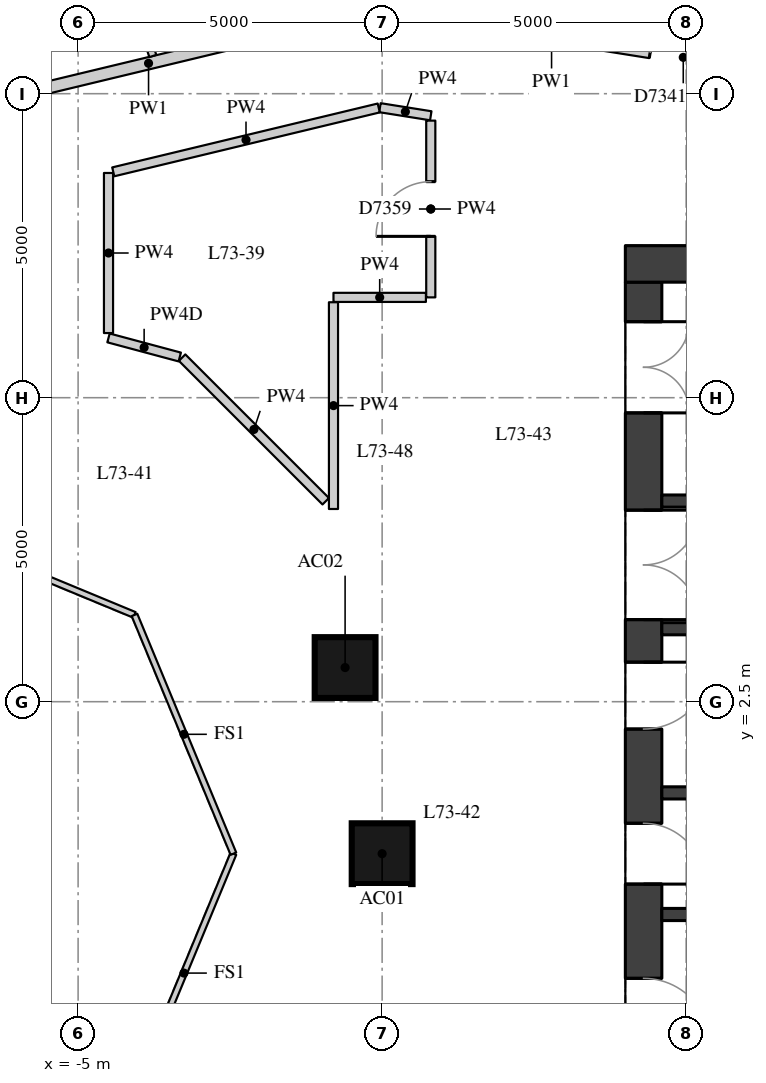
"""IFC4 building model, lengths in metres.
Left out: names, types, materials, properties, quantities, classifications, styles, units other than length and angle.
Written with IfcOpenShell. Run it as: python <this file> out.ifc"""

import sys

from ifc_helpers import new_model, si_unit, direction, frame, frame_2d, origin, origin_2d, place, context, subcontext, project, spatial, rectangle, extrude, element, fill, save


model = new_model("IFC4")
c1 = context("Model", 3, precision=1e-05, world=origin(), true_north=direction((0.0, 1.0)))
c2 = subcontext(c1, "Body", "Model", "MODEL_VIEW")
j1 = project(units=[si_unit("LENGTHUNIT", "METRE"), si_unit("PLANEANGLEUNIT", "RADIAN")], contexts=[c1])
p1 = place(None, origin())
s1 = spatial("IfcSite", under=j1, at=p1, CompositionType="ELEMENT")
p2 = place(p1, origin())
s2 = spatial("IfcBuilding", under=s1, at=p2, CompositionType="ELEMENT")
p3 = place(p2, frame((0.0, 0.0, 256.4)))
s3 = spatial("IfcBuildingStorey", under=s2, at=p3, CompositionType="ELEMENT", Elevation=256.4)
for number, where, z_axis, x_axis in (
    (1, (0.0, 0.0, 0.0), (0.0, 0.0, 1.0), (1.0, 0.0, 0.0)),
    (2, (-0.609, 3.062, 0.0), (0.0, 0.0, 1.0), (1.0, 0.0, 0.0)),
):
    element("IfcColumn", number, at=place(p3, frame(where, z_axis=z_axis, x_axis=x_axis)), inside=s3, PredefinedType="COLUMN", context=c2, shape_type="SweptSolid", body=[
        extrude(rectangle(XDim=1.0, YDim=1.0, at=origin_2d()), origin(), (0.0, 0.0, 1.0), 3.3),
    ])
p4 = place(p3, frame((4.3, -9.4, 0.0), z_axis=(0.0, 0.0, 1.0), x_axis=(0.0, 1.0, 0.0)))
e3 = element("IfcWall", 3, at=p4, inside=s3, PredefinedType="SHEAR", context=c2, shape_type="SweptSolid", body=[
    extrude(rectangle(XDim=18.8, YDim=0.6, at=frame_2d((9.4, 0.0))), origin(), (0.0, 0.0, 1.0), 2.95),
])
p5 = place(p4, frame((0.65, 0.0, 0.0)))
e4 = element("IfcOpeningElement", 4, at=p5, cuts=e3, PredefinedType="OPENING", context=c2, shape_type="SweptSolid", body=[
    extrude(rectangle(XDim=1.5, YDim=2.1, at=frame_2d((0.75, 1.05))), frame((0.0, 0.31, 0.0), z_axis=(0.0, -1.0, 0.0), x_axis=(1.0, 0.0, 0.0)), (0.0, 0.0, 1.0), 0.62),
])
p6 = place(p4, frame((3.75, 0.0, 0.0)))
e5 = element("IfcOpeningElement", 5, at=p6, cuts=e3, PredefinedType="OPENING", context=c2, shape_type="SweptSolid", body=[
    extrude(rectangle(XDim=1.8, YDim=2.1, at=frame_2d((0.9, 1.05))), frame((0.0, 0.31, 0.0), z_axis=(0.0, -1.0, 0.0), x_axis=(1.0, 0.0, 0.0)), (0.0, 0.0, 1.0), 0.62),
])
p7 = place(p4, frame((6.25, 0.0, 0.0)))
e6 = element("IfcOpeningElement", 6, at=p7, cuts=e3, PredefinedType="OPENING", context=c2, shape_type="SweptSolid", body=[
    extrude(rectangle(XDim=1.1, YDim=2.1, at=frame_2d((0.55, 1.05))), frame((0.0, 0.31, 0.0), z_axis=(0.0, -1.0, 0.0), x_axis=(1.0, 0.0, 0.0)), (0.0, 0.0, 1.0), 0.62),
])
p8 = place(p4, frame((8.9, 0.0, 0.0)))
e7 = element("IfcOpeningElement", 7, at=p8, cuts=e3, PredefinedType="OPENING", context=c2, shape_type="SweptSolid", body=[
    extrude(rectangle(XDim=1.0, YDim=2.1, at=frame_2d((0.5, 1.05))), frame((0.0, 0.31, 0.0), z_axis=(0.0, -1.0, 0.0), x_axis=(1.0, 0.0, 0.0)), (0.0, 0.0, 1.0), 0.62),
])
p9 = place(p4, frame((11.45, 0.0, 0.0)))
e8 = element("IfcOpeningElement", 8, at=p9, cuts=e3, PredefinedType="OPENING", context=c2, shape_type="SweptSolid", body=[
    extrude(rectangle(XDim=1.1, YDim=2.1, at=frame_2d((0.55, 1.05))), frame((0.0, 0.31, 0.0), z_axis=(0.0, -1.0, 0.0), x_axis=(1.0, 0.0, 0.0)), (0.0, 0.0, 1.0), 0.62),
])
p10 = place(p4, frame((13.25, 0.0, 0.0)))
e9 = element("IfcOpeningElement", 9, at=p10, cuts=e3, PredefinedType="OPENING", context=c2, shape_type="SweptSolid", body=[
    extrude(rectangle(XDim=1.8, YDim=2.1, at=frame_2d((0.9, 1.05))), frame((0.0, 0.31, 0.0), z_axis=(0.0, -1.0, 0.0), x_axis=(1.0, 0.0, 0.0)), (0.0, 0.0, 1.0), 0.62),
])
p11 = place(p4, frame((16.65, 0.0, 0.0)))
e10 = element("IfcOpeningElement", 10, at=p11, cuts=e3, PredefinedType="OPENING", context=c2, shape_type="SweptSolid", body=[
    extrude(rectangle(XDim=1.5, YDim=2.1, at=frame_2d((0.75, 1.05))), frame((0.0, 0.31, 0.0), z_axis=(0.0, -1.0, 0.0), x_axis=(1.0, 0.0, 0.0)), (0.0, 0.0, 1.0), 0.62),
])
p12 = place(p3, frame((4.0, 9.7, 0.0), z_axis=(0.0, 0.0, 1.0), x_axis=(1.0, 0.0, 0.0)))
e11 = element("IfcWall", 11, at=p12, inside=s3, PredefinedType="SHEAR", context=c2, shape_type="SweptSolid", body=[
    extrude(rectangle(XDim=12.0, YDim=0.6, at=frame_2d((6.0, 0.0))), origin(), (0.0, 0.0, 1.0), 2.95),
])
p13 = place(p3, frame((4.6, 5.8, 0.0), z_axis=(0.0, 0.0, 1.0), x_axis=(1.0, 0.0, 0.0)))
e12 = element("IfcWall", 12, at=p13, inside=s3, PredefinedType="SHEAR", context=c2, shape_type="SweptSolid", body=[
    extrude(rectangle(XDim=10.8, YDim=0.2, at=frame_2d((5.4, 0.0))), origin(), (0.0, 0.0, 1.0), 2.95),
])
p14 = place(p13, frame((7.05, 0.0, 0.0)))
e13 = element("IfcOpeningElement", 13, at=p14, cuts=e12, PredefinedType="OPENING", context=c2, shape_type="SweptSolid", body=[
    extrude(rectangle(XDim=1.1, YDim=2.1, at=frame_2d((0.55, 1.05))), frame((0.0, 0.11, 0.0), z_axis=(0.0, -1.0, 0.0), x_axis=(1.0, 0.0, 0.0)), (0.0, 0.0, 1.0), 0.22),
])
p15 = place(p13, frame((9.05, 0.0, 0.0)))
e14 = element("IfcOpeningElement", 14, at=p15, cuts=e12, PredefinedType="OPENING", context=c2, shape_type="SweptSolid", body=[
    extrude(rectangle(XDim=1.1, YDim=2.1, at=frame_2d((0.55, 1.05))), frame((0.0, 0.11, 0.0), z_axis=(0.0, -1.0, 0.0), x_axis=(1.0, 0.0, 0.0)), (0.0, 0.0, 1.0), 0.22),
])
p16 = place(p3, frame((4.6, 3.7, 0.0), z_axis=(0.0, 0.0, 1.0), x_axis=(1.0, 0.0, 0.0)))
e15 = element("IfcWall", 15, at=p16, inside=s3, PredefinedType="SHEAR", context=c2, shape_type="SweptSolid", body=[
    extrude(rectangle(XDim=10.8, YDim=0.2, at=frame_2d((5.4, 0.0))), origin(), (0.0, 0.0, 1.0), 2.95),
])
p17 = place(p16, frame((6.6, 0.0, 0.0)))
e16 = element("IfcOpeningElement", 16, at=p17, cuts=e15, PredefinedType="OPENING", context=c2, shape_type="SweptSolid", body=[
    extrude(rectangle(XDim=1.1, YDim=2.1, at=frame_2d((0.55, 1.05))), frame((0.0, 0.11, 0.0), z_axis=(0.0, -1.0, 0.0), x_axis=(1.0, 0.0, 0.0)), (0.0, 0.0, 1.0), 0.22),
])
p18 = place(p16, frame((8.9, 0.0, 0.0)))
e17 = element("IfcOpeningElement", 17, at=p18, cuts=e15, PredefinedType="OPENING", context=c2, shape_type="SweptSolid", body=[
    extrude(rectangle(XDim=1.1, YDim=2.1, at=frame_2d((0.55, 1.05))), frame((0.0, 0.11, 0.0), z_axis=(0.0, -1.0, 0.0), x_axis=(1.0, 0.0, 0.0)), (0.0, 0.0, 1.0), 0.22),
])
for number, where, z_axis, x_axis in (
    (18, (4.6, 1.0, 0.0), (0.0, 0.0, 1.0), (1.0, 0.0, 0.0)),
    (19, (4.6, -1.0, 0.0), (0.0, 0.0, 1.0), (1.0, 0.0, 0.0)),
):
    element("IfcWall", number, at=place(p3, frame(where, z_axis=z_axis, x_axis=x_axis)), inside=s3, PredefinedType="SHEAR", context=c2, shape_type="SweptSolid", body=[
        extrude(rectangle(XDim=10.8, YDim=0.2, at=frame_2d((5.4, 0.0))), origin(), (0.0, 0.0, 1.0), 2.95),
    ])
p19 = place(p3, frame((-7.583, 12.1, 0.0), z_axis=(0.0, 0.0, 1.0), x_axis=(0.97226305798, 0.233890029903, 0.0)))
e20 = element("IfcWall", 20, at=p19, inside=s3, PredefinedType="PARTITIONING", context=c2, shape_type="SweptSolid", body=[
    extrude(rectangle(XDim=7.696, YDim=0.2, at=frame_2d((3.848, 0.0))), origin(), (0.0, 0.0, 1.0), 2.95),
])
p20 = place(p19, frame((5.85, 0.0, 0.0)))
e21 = element("IfcOpeningElement", 21, at=p20, cuts=e20, PredefinedType="OPENING", context=c2, shape_type="SweptSolid", body=[
    extrude(rectangle(XDim=1.1, YDim=2.1, at=frame_2d((0.55, 1.05))), frame((0.0, 0.11, 0.0), z_axis=(0.0, -1.0, 0.0), x_axis=(1.0, 0.0, 0.0)), (0.0, 0.0, 1.0), 0.22),
])
p21 = place(p19, frame((0.399, 0.0, 0.0)))
e22 = element("IfcOpeningElement", 22, at=p21, cuts=e20, PredefinedType="OPENING", context=c2, shape_type="SweptSolid", body=[
    extrude(rectangle(XDim=0.9, YDim=2.1, at=frame_2d((0.45, 1.05))), frame((0.0, 0.11, 0.0), z_axis=(0.0, -1.0, 0.0), x_axis=(1.0, 0.0, 0.0)), (0.0, 0.0, 1.0), 0.22),
])
p22 = place(p3, frame((-0.061, 13.894, 0.0), z_axis=(0.0, 0.0, 1.0), x_axis=(0.987623870558, -0.156840971383, 0.0)))
e23 = element("IfcWall", 23, at=p22, inside=s3, PredefinedType="PARTITIONING", context=c2, shape_type="SweptSolid", body=[
    extrude(rectangle(XDim=5.766, YDim=0.2, at=frame_2d((2.883, 0.0))), origin(), (0.0, 0.0, 1.0), 2.95),
])
p23 = place(p22, frame((4.526, 0.0, 0.0)))
e24 = element("IfcOpeningElement", 24, at=p23, cuts=e23, PredefinedType="OPENING", context=c2, shape_type="SweptSolid", body=[
    extrude(rectangle(XDim=1.1, YDim=2.1, at=frame_2d((0.55, 1.05))), frame((0.0, 0.11, 0.0), z_axis=(0.0, -1.0, 0.0), x_axis=(1.0, 0.0, 0.0)), (0.0, 0.0, 1.0), 0.22),
])
p24 = place(p3, frame((-0.036, 12.27, 0.0), z_axis=(0.0, 0.0, 1.0), x_axis=(0.987612834354, -0.156910450318, 0.0)))
e25 = element("IfcWall", 25, at=p24, inside=s3, PredefinedType="PARTITIONING", context=c2, shape_type="SweptSolid", body=[
    extrude(rectangle(XDim=0.846, YDim=0.15, at=frame_2d((0.423, 0.0))), origin(), (0.0, 0.0, 1.0), 2.95),
])
p25 = place(p3, frame((0.8, 12.057, 0.0), z_axis=(0.0, 0.0, 1.0), x_axis=(0.0, -1.0, 0.0)))
e26 = element("IfcWall", 26, at=p25, inside=s3, PredefinedType="PARTITIONING", context=c2, shape_type="SweptSolid", body=[
    extrude(rectangle(XDim=2.907, YDim=0.15, at=frame_2d((1.454, 0.0))), origin(), (0.0, 0.0, 1.0), 2.95),
])
p26 = place(p25, frame((1.003, 0.0, 0.0)))
e27 = element("IfcOpeningElement", 27, at=p26, cuts=e26, PredefinedType="OPENING", context=c2, shape_type="SweptSolid", body=[
    extrude(rectangle(XDim=0.9, YDim=2.1, at=frame_2d((0.45, 1.05))), frame((0.0, 0.085, 0.0), z_axis=(0.0, -1.0, 0.0), x_axis=(1.0, 0.0, 0.0)), (0.0, 0.0, 1.0), 0.17),
])
p27 = place(p3, frame((0.72, 9.15, 0.0), z_axis=(0.0, 0.0, 1.0), x_axis=(-1.0, 0.0, 0.0)))
e28 = element("IfcWall", 28, at=p27, inside=s3, PredefinedType="PARTITIONING", context=c2, shape_type="SweptSolid", body=[
    extrude(rectangle(XDim=1.52, YDim=0.15, at=frame_2d((0.76, 0.0))), origin(), (0.0, 0.0, 1.0), 2.95),
])
p28 = place(p3, frame((-0.8, 9.07, 0.0), z_axis=(0.0, 0.0, 1.0), x_axis=(0.0, -1.0, 0.0)))
e29 = element("IfcWall", 29, at=p28, inside=s3, PredefinedType="PARTITIONING", context=c2, shape_type="SweptSolid", body=[
    extrude(rectangle(XDim=3.4, YDim=0.15, at=frame_2d((1.7, 0.0))), origin(), (0.0, 0.0, 1.0), 2.95),
])
p29 = place(p3, frame((-0.927, 5.797, 0.0), z_axis=(0.0, 0.0, 1.0), x_axis=(-0.707106781187, 0.707106781187, 0.0)))
e30 = element("IfcWall", 30, at=p29, inside=s3, PredefinedType="PARTITIONING", context=c2, shape_type="SweptSolid", body=[
    extrude(rectangle(XDim=3.341, YDim=0.15, at=frame_2d((1.67, 0.0))), origin(), (0.0, 0.0, 1.0), 2.95),
])
p30 = place(p3, frame((-3.328, 8.169, 0.0), z_axis=(0.0, 0.0, 1.0), x_axis=(-0.965933680277, 0.258789731841, 0.0)))
e31 = element("IfcWall", 31, at=p30, inside=s3, PredefinedType="PARTITIONING", context=c2, shape_type="SweptSolid", body=[
    extrude(rectangle(XDim=1.213, YDim=0.15, at=frame_2d((0.606, 0.0))), origin(), (0.0, 0.0, 1.0), 2.4),
])
p31 = place(p3, frame((-4.5, 8.563, 0.0), z_axis=(0.0, 0.0, 1.0), x_axis=(0.0, 1.0, 0.0)))
e32 = element("IfcWall", 32, at=p31, inside=s3, PredefinedType="PARTITIONING", context=c2, shape_type="SweptSolid", body=[
    extrude(rectangle(XDim=2.633, YDim=0.15, at=frame_2d((1.316, 0.0))), origin(), (0.0, 0.0, 1.0), 2.95),
])
p32 = place(p3, frame((-4.422, 11.215, 0.0), z_axis=(0.0, 0.0, 1.0), x_axis=(0.972256385538, 0.233917764997, 0.0)))
e33 = element("IfcWall", 33, at=p32, inside=s3, PredefinedType="PARTITIONING", context=c2, shape_type="SweptSolid", body=[
    extrude(rectangle(XDim=4.491, YDim=0.15, at=frame_2d((2.246, 0.0))), origin(), (0.0, 0.0, 1.0), 2.95),
])
p33 = place(p3, frame((-3.771, 13.12, 0.0), z_axis=(0.0, 0.0, 1.0), x_axis=(-0.312336886671, 0.949971404425, 0.0)))
e34 = element("IfcWall", 34, at=p33, inside=s3, PredefinedType="PARTITIONING", context=c2, shape_type="SweptSolid", body=[
    extrude(rectangle(XDim=2.863, YDim=0.12, at=frame_2d((1.432, 0.0))), origin(), (0.0, 0.0, 1.0), 2.95),
])
for number, where, z_axis, x_axis in (
    (35, (-2.446, 0.0, 0.0), (0.0, 0.0, 1.0), (-0.383, -0.924, 0.0)),
    (36, (-8.0, 5.554, 0.0), (0.0, 0.0, 1.0), (0.924, -0.383, 0.0)),
    (37, (-4.073, 3.927, 0.0), (0.0, 0.0, 1.0), (0.383, -0.924, 0.0)),
):
    element("IfcWall", number, at=place(p3, frame(where, z_axis=z_axis, x_axis=x_axis)), inside=s3, PredefinedType="PARTITIONING", context=c2, shape_type="SweptSolid", body=[
        extrude(rectangle(XDim=4.251, YDim=0.1, at=frame_2d((2.125, 0.0))), origin(), (0.0, 0.0, 1.0), 2.95),
    ])
p34 = place(p7, origin())
e38 = element("IfcDoor", 38, at=p34, inside=s3, OperationType="SINGLE_SWING_RIGHT", PredefinedType="DOOR", context=c2, shape_type="SweptSolid", body=[
    extrude(rectangle(XDim=1.1, YDim=2.1, at=frame_2d((0.55, 1.05))), frame((0.0, 0.025, 0.0), z_axis=(0.0, -1.0, 0.0), x_axis=(1.0, 0.0, 0.0)), (0.0, 0.0, 1.0), 0.05),
])
fill(e6, e38)
p35 = place(p8, origin())
e39 = element("IfcDoor", 39, at=p35, inside=s3, OperationType="SINGLE_SWING_RIGHT", PredefinedType="DOOR", context=c2, shape_type="SweptSolid", body=[
    extrude(rectangle(XDim=1.0, YDim=2.1, at=frame_2d((0.5, 1.05))), frame((0.0, 0.025, 0.0), z_axis=(0.0, -1.0, 0.0), x_axis=(1.0, 0.0, 0.0)), (0.0, 0.0, 1.0), 0.05),
])
fill(e7, e39)
p36 = place(p9, origin())
e40 = element("IfcDoor", 40, at=p36, inside=s3, OperationType="SINGLE_SWING_LEFT", PredefinedType="DOOR", context=c2, shape_type="SweptSolid", body=[
    extrude(rectangle(XDim=1.1, YDim=2.1, at=frame_2d((0.55, 1.05))), frame((0.0, 0.025, 0.0), z_axis=(0.0, -1.0, 0.0), x_axis=(1.0, 0.0, 0.0)), (0.0, 0.0, 1.0), 0.05),
])
fill(e8, e40)
p37 = place(p10, origin())
e41 = element("IfcDoor", 41, at=p37, inside=s3, OperationType="DOUBLE_DOOR_SINGLE_SWING", PredefinedType="DOOR", context=c2, shape_type="SweptSolid", body=[
    extrude(rectangle(XDim=1.8, YDim=2.1, at=frame_2d((0.9, 1.05))), frame((0.0, 0.025, 0.0), z_axis=(0.0, -1.0, 0.0), x_axis=(1.0, 0.0, 0.0)), (0.0, 0.0, 1.0), 0.05),
])
fill(e9, e41)
p38 = place(p11, origin())
e42 = element("IfcDoor", 42, at=p38, inside=s3, OperationType="DOUBLE_DOOR_SINGLE_SWING", PredefinedType="DOOR", context=c2, shape_type="SweptSolid", body=[
    extrude(rectangle(XDim=1.5, YDim=2.1, at=frame_2d((0.75, 1.05))), frame((0.0, 0.025, 0.0), z_axis=(0.0, -1.0, 0.0), x_axis=(1.0, 0.0, 0.0)), (0.0, 0.0, 1.0), 0.05),
])
fill(e10, e42)
p39 = place(p23, origin())
e43 = element("IfcDoor", 43, at=p39, inside=s3, OperationType="SINGLE_SWING_RIGHT", PredefinedType="DOOR", context=c2, shape_type="SweptSolid", body=[
    extrude(rectangle(XDim=1.1, YDim=2.1, at=frame_2d((0.55, 1.05))), frame((0.0, 0.025, 0.0), z_axis=(0.0, -1.0, 0.0), x_axis=(1.0, 0.0, 0.0)), (0.0, 0.0, 1.0), 0.05),
])
fill(e24, e43)
p40 = place(p26, origin())
e44 = element("IfcDoor", 44, at=p40, inside=s3, OperationType="SINGLE_SWING_LEFT", PredefinedType="DOOR", context=c2, shape_type="SweptSolid", body=[
    extrude(rectangle(XDim=0.9, YDim=2.1, at=frame_2d((0.45, 1.05))), frame((0.0, 0.025, 0.0), z_axis=(0.0, -1.0, 0.0), x_axis=(1.0, 0.0, 0.0)), (0.0, 0.0, 1.0), 0.05),
])
fill(e27, e44)
save(model, sys.argv[1])
